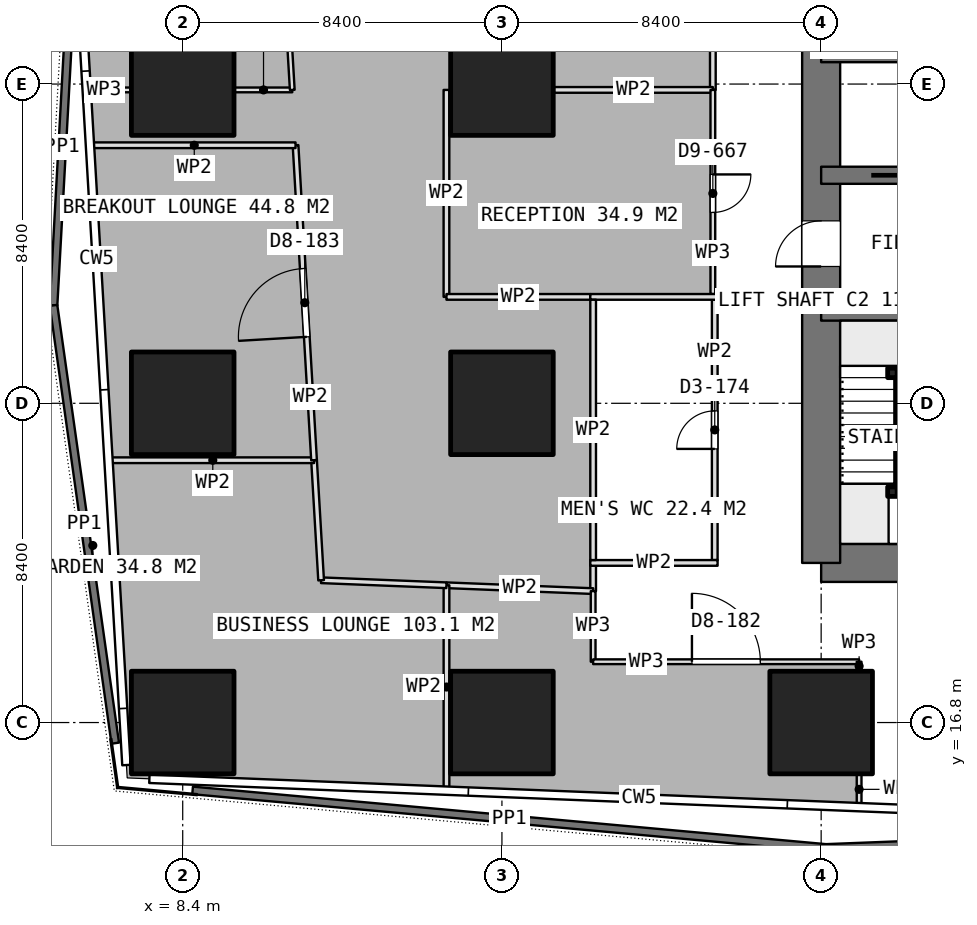
"""IFC4 building model, lengths in metres.
Left out: names, types, materials, properties, quantities, classifications, styles, units other than length and angle.
Written with IfcOpenShell. Run it as: python <this file> out.ifc"""

import sys

from ifc_helpers import new_model, si_unit, direction, frame, frame_2d, origin, origin_2d, place, context, subcontext, project, spatial, rectangle, extrude, element, fill, save


model = new_model("IFC4")
c1 = context("Model", 3, precision=1e-05, world=origin(), true_north=direction((0.0, 1.0)))
c2 = subcontext(c1, "Body", "Model", "MODEL_VIEW")
j1 = project(units=[si_unit("LENGTHUNIT", "METRE"), si_unit("PLANEANGLEUNIT", "RADIAN")], contexts=[c1])
p1 = place(None, origin())
s1 = spatial("IfcSite", under=j1, at=p1, CompositionType="ELEMENT")
p2 = place(p1, origin())
s2 = spatial("IfcBuilding", under=s1, at=p2, CompositionType="ELEMENT")
p3 = place(p2, frame((0.0, 0.0, 168.2)))
s3 = spatial("IfcBuildingStorey", under=s2, at=p3, CompositionType="ELEMENT", Elevation=168.2)
p4 = place(p3, frame((25.2, 21.0, 0.0), z_axis=(0.0, 0.0, 1.0), x_axis=(1.0, 0.0, 0.0)))
e1 = element("IfcWall", 1, at=p4, inside=s3, PredefinedType="SHEAR", context=c2, shape_type="SweptSolid", body=[
    extrude(rectangle(XDim=10.4, YDim=1.0, at=frame_2d((5.2, 0.0))), origin(), (0.0, 0.0, 1.0), 4.5),
])
p5 = place(p3, frame((25.2, 21.0, 0.0), z_axis=(0.0, 0.0, 1.0), x_axis=(0.0, 1.0, 0.0)))
e2 = element("IfcWall", 2, at=p5, inside=s3, PredefinedType="SHEAR", context=c2, shape_type="SweptSolid", body=[
    extrude(rectangle(XDim=25.2, YDim=1.0, at=frame_2d((12.6, 0.0))), origin(), (0.0, 0.0, 1.0), 4.5),
])
p6 = place(p5, frame((7.8, 0.0, 0.0)))
e3 = element("IfcOpeningElement", 3, at=p6, cuts=e2, PredefinedType="OPENING", context=c2, shape_type="SweptSolid", body=[
    extrude(rectangle(XDim=1.2, YDim=2.1, at=frame_2d((0.6, 1.05))), frame((0.0, 0.51, 0.0), z_axis=(0.0, -1.0, 0.0), x_axis=(1.0, 0.0, 0.0)), (0.0, 0.0, 1.0), 1.02),
])
p7 = place(p5, frame((14.25, 0.0, 0.0)))
e4 = element("IfcOpeningElement", 4, at=p7, cuts=e2, PredefinedType="OPENING", context=c2, shape_type="SweptSolid", body=[
    extrude(rectangle(XDim=0.9, YDim=2.1, at=frame_2d((0.45, 1.05))), frame((0.0, 0.51, 0.0), z_axis=(0.0, -1.0, 0.0), x_axis=(1.0, 0.0, 0.0)), (0.0, 0.0, 1.0), 1.02),
])
p8 = place(p5, frame((16.85, 0.0, 0.0)))
e5 = element("IfcOpeningElement", 5, at=p8, cuts=e2, PredefinedType="OPENING", context=c2, shape_type="SweptSolid", body=[
    extrude(rectangle(XDim=0.9, YDim=2.1, at=frame_2d((0.45, 1.05))), frame((0.0, 0.51, 0.0), z_axis=(0.0, -1.0, 0.0), x_axis=(1.0, 0.0, 0.0)), (0.0, 0.0, 1.0), 1.02),
])
p9 = place(p5, frame((19.025, 0.0, 0.0)))
e6 = element("IfcOpeningElement", 6, at=p9, cuts=e2, PredefinedType="OPENING", context=c2, shape_type="SweptSolid", body=[
    extrude(rectangle(XDim=1.2, YDim=2.1, at=frame_2d((0.6, 1.05))), frame((0.0, 0.51, 0.0), z_axis=(0.0, -1.0, 0.0), x_axis=(1.0, 0.0, 0.0)), (0.0, 0.0, 1.0), 1.02),
])
p10 = place(p3, frame((25.2, 27.6, 0.0), z_axis=(0.0, 0.0, 1.0), x_axis=(1.0, 0.0, 0.0)))
e7 = element("IfcWall", 7, at=p10, inside=s3, PredefinedType="SHEAR", context=c2, shape_type="SweptSolid", body=[
    extrude(rectangle(XDim=6.6, YDim=0.45, at=frame_2d((3.3, 0.0))), origin(), (0.0, 0.0, 1.0), 4.5),
])
p11 = place(p10, frame((4.975, 0.0, 0.0)))
e8 = element("IfcOpeningElement", 8, at=p11, cuts=e7, PredefinedType="OPENING", context=c2, shape_type="SweptSolid", body=[
    extrude(rectangle(XDim=1.2, YDim=2.1, at=frame_2d((0.6, 1.05))), frame((0.0, 0.235, 0.0), z_axis=(0.0, -1.0, 0.0), x_axis=(1.0, 0.0, 0.0)), (0.0, 0.0, 1.0), 0.47),
])
p12 = place(p3, frame((25.2, 31.2, 0.0), z_axis=(0.0, 0.0, 1.0), x_axis=(1.0, 0.0, 0.0)))
e9 = element("IfcWall", 9, at=p12, inside=s3, PredefinedType="SHEAR", context=c2, shape_type="SweptSolid", body=[
    extrude(rectangle(XDim=6.6, YDim=0.45, at=frame_2d((3.3, 0.0))), origin(), (0.0, 0.0, 1.0), 4.5),
])
p13 = place(p12, frame((2.65, 0.0, 0.0)))
e10 = element("IfcOpeningElement", 10, at=p13, cuts=e9, PredefinedType="OPENING", context=c2, shape_type="SweptSolid", body=[
    extrude(rectangle(XDim=1.3, YDim=2.1, at=frame_2d((0.65, 1.05))), frame((0.0, 0.235, 0.0), z_axis=(0.0, -1.0, 0.0), x_axis=(1.0, 0.0, 0.0)), (0.0, 0.0, 1.0), 0.47),
])
p14 = place(p3, frame((25.2, 34.4, 0.0), z_axis=(0.0, 0.0, 1.0), x_axis=(1.0, 0.0, 0.0)))
e11 = element("IfcWall", 11, at=p14, inside=s3, PredefinedType="SHEAR", context=c2, shape_type="SweptSolid", body=[
    extrude(rectangle(XDim=6.6, YDim=0.45, at=frame_2d((3.3, 0.0))), origin(), (0.0, 0.0, 1.0), 4.5),
])
for number, where, z_axis, x_axis in (
    (12, (8.4, 16.8, 0.0), (0.0, 0.0, 1.0), (1.0, 0.0, 0.0)),
    (13, (8.4, 25.2, 0.0), (0.0, 0.0, 1.0), (1.0, 0.0, 0.0)),
    (14, (8.4, 33.6, 0.0), (0.0, 0.0, 1.0), (1.0, 0.0, 0.0)),
    (15, (16.8, 16.8, 0.0), (0.0, 0.0, 1.0), (1.0, 0.0, 0.0)),
    (16, (16.8, 25.2, 0.0), (0.0, 0.0, 1.0), (1.0, 0.0, 0.0)),
    (17, (16.8, 33.6, 0.0), (0.0, 0.0, 1.0), (1.0, 0.0, 0.0)),
    (18, (25.2, 16.8, 0.0), (0.0, 0.0, 1.0), (1.0, 0.0, 0.0)),
):
    element("IfcColumn", number, at=place(p3, frame(where, z_axis=z_axis, x_axis=x_axis)), inside=s3, PredefinedType="COLUMN", context=c2, shape_type="SweptSolid", body=[
        extrude(rectangle(XDim=2.7, YDim=2.7, at=origin_2d()), origin(), (0.0, 0.0, 1.0), 4.5),
    ])
p15 = place(p3, frame((5.457, 36.096, 0.0), z_axis=(0.0, 0.0, 1.0), x_axis=(-0.05473645857, -0.998500836306, 0.0)))
e19 = element("IfcWall", 19, at=p15, inside=s3, PredefinedType="PARAPET", context=c2, shape_type="SweptSolid", body=[
    extrude(rectangle(XDim=8.332, YDim=0.2, at=frame_2d((4.166, 0.0))), origin(), (0.0, 0.0, 1.0), 1.1),
])
p16 = place(p3, frame((5.001, 27.777, 0.0), z_axis=(0.0, 0.0, 1.0), x_axis=(0.139605325678, -0.990207227323, 0.0)))
e20 = element("IfcWall", 20, at=p16, inside=s3, PredefinedType="PARAPET", context=c2, shape_type="SweptSolid", body=[
    extrude(rectangle(XDim=11.633, YDim=0.2, at=frame_2d((5.816, 0.0))), origin(), (0.0, 0.0, 1.0), 1.1),
])
p17 = place(p3, frame((8.66, 15.014, 0.0), z_axis=(0.0, 0.0, 1.0), x_axis=(0.995901573545, -0.090443660974, 0.0)))
e21 = element("IfcWall", 21, at=p17, inside=s3, PredefinedType="PARAPET", context=c2, shape_type="SweptSolid", body=[
    extrude(rectangle(XDim=16.733, YDim=0.2, at=frame_2d((8.367, 0.0))), origin(), (0.0, 0.0, 1.0), 1.1),
])
p18 = place(p3, frame((25.325, 13.5, 0.0), z_axis=(0.0, 0.0, 1.0), x_axis=(0.999243289586, 0.03889534955, 0.0)))
e22 = element("IfcWall", 22, at=p18, inside=s3, PredefinedType="PARAPET", context=c2, shape_type="SweptSolid", body=[
    extrude(rectangle(XDim=10.771, YDim=0.2, at=frame_2d((5.385, 0.0))), origin(), (0.0, 0.0, 1.0), 1.1),
])
for number, where, z_axis, x_axis in (
    (23, (19.125, 21.0, 0.0), (0.0, 0.0, 1.0), (1.0, 0.0, 0.0)),
    (24, (19.125, 28.0, 0.0), (0.0, 0.0, 1.0), (1.0, 0.0, 0.0)),
):
    element("IfcWall", number, at=place(p3, frame(where, z_axis=z_axis, x_axis=x_axis)), inside=s3, PredefinedType="PARTITIONING", context=c2, shape_type="SweptSolid", body=[
        extrude(rectangle(XDim=3.35, YDim=0.15, at=frame_2d((1.675, 0.0))), origin(), (0.0, 0.0, 1.0), 4.25),
    ])
p19 = place(p3, frame((19.2, 21.075, 0.0), z_axis=(0.0, 0.0, 1.0), x_axis=(0.0, 1.0, 0.0)))
e25 = element("IfcWall", 25, at=p19, inside=s3, PredefinedType="PARTITIONING", context=c2, shape_type="SweptSolid", body=[
    extrude(rectangle(XDim=6.85, YDim=0.15, at=frame_2d((3.425, 0.0))), origin(), (0.0, 0.0, 1.0), 4.25),
])
p20 = place(p3, frame((22.4, 21.075, 0.0), z_axis=(0.0, 0.0, 1.0), x_axis=(0.0, 1.0, 0.0)))
e26 = element("IfcWall", 26, at=p20, inside=s3, PredefinedType="PARTITIONING", context=c2, shape_type="SweptSolid", body=[
    extrude(rectangle(XDim=6.85, YDim=0.15, at=frame_2d((3.425, 0.0))), origin(), (0.0, 0.0, 1.0), 4.25),
])
p21 = place(p20, frame((2.925, 0.0, 0.0)))
e27 = element("IfcOpeningElement", 27, at=p21, cuts=e26, PredefinedType="OPENING", context=c2, shape_type="SweptSolid", body=[
    extrude(rectangle(XDim=1.0, YDim=2.1, at=frame_2d((0.5, 1.05))), frame((0.0, 0.085, 0.0), z_axis=(0.0, -1.0, 0.0), x_axis=(1.0, 0.0, 0.0)), (0.0, 0.0, 1.0), 0.17),
])
p22 = place(p3, frame((11.283, 33.446, 0.0), z_axis=(0.0, 0.0, 1.0), x_axis=(-1.0, 0.0, 0.0)))
e28 = element("IfcWall", 28, at=p22, inside=s3, PredefinedType="PARTITIONING", context=c2, shape_type="SweptSolid", body=[
    extrude(rectangle(XDim=1.513, YDim=0.125, at=frame_2d((0.756, 0.0))), origin(), (0.0, 0.0, 1.0), 4.25),
])
p23 = place(p3, frame((7.03, 33.446, 0.0), z_axis=(0.0, 0.0, 1.0), x_axis=(-1.0, 0.0, 0.0)))
e29 = element("IfcWall", 29, at=p23, inside=s3, PredefinedType="PARTITIONING", context=c2, shape_type="SweptSolid", body=[
    extrude(rectangle(XDim=1.076, YDim=0.125, at=frame_2d((0.538, 0.0))), origin(), (0.0, 0.0, 1.0), 4.25),
])
p24 = place(p3, frame((10.765, 42.248, 0.0), z_axis=(0.0, 0.0, 1.0), x_axis=(0.05875610806, -0.998272367526, 0.0)))
e30 = element("IfcWall", 30, at=p24, inside=s3, PredefinedType="PARTITIONING", context=c2, shape_type="SweptSolid", body=[
    extrude(rectangle(XDim=8.817, YDim=0.125, at=frame_2d((4.409, 0.0))), origin(), (0.0, 0.0, 1.0), 4.25),
])
p25 = place(p24, frame((3.509, 0.0, 0.0)))
e31 = element("IfcOpeningElement", 31, at=p25, cuts=e30, PredefinedType="OPENING", context=c2, shape_type="SweptSolid", body=[
    extrude(rectangle(XDim=1.8, YDim=2.1, at=frame_2d((0.9, 1.05))), frame((0.0, 0.073, 0.0), z_axis=(0.0, -1.0, 0.0), x_axis=(1.0, 0.0, 0.0)), (0.0, 0.0, 1.0), 0.145),
])
p26 = place(p3, frame((22.35, 53.25, 0.0), z_axis=(0.0, 0.0, 1.0), x_axis=(0.0, -1.0, 0.0)))
e32 = element("IfcWall", 32, at=p26, inside=s3, PredefinedType="PARTITIONING", context=c2, shape_type="SweptSolid", body=[
    extrude(rectangle(XDim=19.804, YDim=0.15, at=frame_2d((9.902, 0.0))), origin(), (0.0, 0.0, 1.0), 4.25),
])
p27 = place(p26, frame((9.402, 0.0, 0.0)))
e33 = element("IfcOpeningElement", 33, at=p27, cuts=e32, PredefinedType="OPENING", context=c2, shape_type="SweptSolid", body=[
    extrude(rectangle(XDim=1.0, YDim=2.1, at=frame_2d((0.5, 1.05))), frame((0.0, 0.085, 0.0), z_axis=(0.0, -1.0, 0.0), x_axis=(1.0, 0.0, 0.0)), (0.0, 0.0, 1.0), 0.17),
])
p28 = place(p3, frame((22.35, 33.446, 0.0), z_axis=(0.0, 0.0, 1.0), x_axis=(-1.0, 0.0, 0.0)))
e34 = element("IfcWall", 34, at=p28, inside=s3, PredefinedType="PARTITIONING", context=c2, shape_type="SweptSolid", body=[
    extrude(rectangle(XDim=4.18, YDim=0.15, at=frame_2d((2.09, 0.0))), origin(), (0.0, 0.0, 1.0), 4.25),
])
p29 = place(p3, frame((15.34, 33.446, 0.0), z_axis=(0.0, 0.0, 1.0), x_axis=(0.0, -1.0, 0.0)))
e35 = element("IfcWall", 35, at=p29, inside=s3, PredefinedType="PARTITIONING", context=c2, shape_type="SweptSolid", body=[
    extrude(rectangle(XDim=5.446, YDim=0.15, at=frame_2d((2.723, 0.0))), origin(), (0.0, 0.0, 1.0), 4.25),
])
p30 = place(p3, frame((15.34, 28.0, 0.0), z_axis=(0.0, 0.0, 1.0), x_axis=(1.0, 0.0, 0.0)))
e36 = element("IfcWall", 36, at=p30, inside=s3, PredefinedType="PARTITIONING", context=c2, shape_type="SweptSolid", body=[
    extrude(rectangle(XDim=3.784, YDim=0.15, at=frame_2d((1.892, 0.0))), origin(), (0.0, 0.0, 1.0), 4.25),
])
p31 = place(p3, frame((19.2, 21.075, 0.0), z_axis=(0.0, 0.0, 1.0), x_axis=(0.0, -1.0, 0.0)))
e37 = element("IfcWall", 37, at=p31, inside=s3, PredefinedType="PARTITIONING", context=c2, shape_type="SweptSolid", body=[
    extrude(rectangle(XDim=0.817, YDim=0.15, at=frame_2d((0.408, 0.0))), origin(), (0.0, 0.0, 1.0), 4.25),
])
p32 = place(p3, frame((19.2, 20.258, 0.0), z_axis=(0.0, 0.0, 1.0), x_axis=(-0.999204086199, 0.039889774667, 0.0)))
e38 = element("IfcWall", 38, at=p32, inside=s3, PredefinedType="PARTITIONING", context=c2, shape_type="SweptSolid", body=[
    extrude(rectangle(XDim=3.862, YDim=0.15, at=frame_2d((1.931, 0.0))), origin(), (0.0, 0.0, 1.0), 4.25),
])
p33 = place(p3, frame((15.341, 20.412, 0.0), z_axis=(0.0, 0.0, 1.0), x_axis=(0.0, -1.0, 0.0)))
e39 = element("IfcWall", 39, at=p33, inside=s3, PredefinedType="PARTITIONING", context=c2, shape_type="SweptSolid", body=[
    extrude(rectangle(XDim=5.355, YDim=0.15, at=frame_2d((2.678, 0.0))), origin(), (0.0, 0.0, 1.0), 4.25),
])
p34 = place(p3, frame((15.34, 20.412, 0.0), z_axis=(0.0, 0.0, 1.0), x_axis=(-0.999202021772, 0.039941453235, 0.0)))
e40 = element("IfcWall", 40, at=p34, inside=s3, PredefinedType="PARTITIONING", context=c2, shape_type="SweptSolid", body=[
    extrude(rectangle(XDim=3.301, YDim=0.15, at=frame_2d((1.65, 0.0))), origin(), (0.0, 0.0, 1.0), 4.25),
])
p35 = place(p3, frame((12.042, 20.544, 0.0), z_axis=(0.0, 0.0, 1.0), x_axis=(-0.058807979637, 0.998269313127, 0.0)))
e41 = element("IfcWall", 41, at=p35, inside=s3, PredefinedType="PARTITIONING", context=c2, shape_type="SweptSolid", body=[
    extrude(rectangle(XDim=3.163, YDim=0.15, at=frame_2d((1.582, 0.0))), origin(), (0.0, 0.0, 1.0), 4.25),
])
p36 = place(p3, frame((11.856, 23.702, 0.0), z_axis=(0.0, 0.0, 1.0), x_axis=(-1.0, 0.0, 0.0)))
e42 = element("IfcWall", 42, at=p36, inside=s3, PredefinedType="PARTITIONING", context=c2, shape_type="SweptSolid", body=[
    extrude(rectangle(XDim=5.329, YDim=0.15, at=frame_2d((2.665, 0.0))), origin(), (0.0, 0.0, 1.0), 4.25),
])
p37 = place(p3, frame((11.856, 23.703, 0.0), z_axis=(0.0, 0.0, 1.0), x_axis=(-0.058672025665, 0.998277312877, 0.0)))
e43 = element("IfcWall", 43, at=p37, inside=s3, PredefinedType="PARTITIONING", context=c2, shape_type="SweptSolid", body=[
    extrude(rectangle(XDim=8.302, YDim=0.15, at=frame_2d((4.151, 0.0))), origin(), (0.0, 0.0, 1.0), 4.25),
])
p38 = place(p37, frame((3.251, 0.0, 0.0)))
e44 = element("IfcOpeningElement", 44, at=p38, cuts=e43, PredefinedType="OPENING", context=c2, shape_type="SweptSolid", body=[
    extrude(rectangle(XDim=1.8, YDim=2.1, at=frame_2d((0.9, 1.05))), frame((0.0, 0.085, 0.0), z_axis=(0.0, -1.0, 0.0), x_axis=(1.0, 0.0, 0.0)), (0.0, 0.0, 1.0), 0.17),
])
p39 = place(p3, frame((11.369, 31.99, 0.0), z_axis=(0.0, 0.0, 1.0), x_axis=(-1.0, 0.0, 0.0)))
e45 = element("IfcWall", 45, at=p39, inside=s3, PredefinedType="PARTITIONING", context=c2, shape_type="SweptSolid", body=[
    extrude(rectangle(XDim=5.33, YDim=0.15, at=frame_2d((2.665, 0.0))), origin(), (0.0, 0.0, 1.0), 4.25),
])
p40 = place(p3, frame((19.2, 20.258, 0.0), z_axis=(0.0, 0.0, 1.0), x_axis=(0.0, -1.0, 0.0)))
e46 = element("IfcWall", 46, at=p40, inside=s3, PredefinedType="PARTITIONING", context=c2, shape_type="SweptSolid", body=[
    extrude(rectangle(XDim=1.858, YDim=0.125, at=frame_2d((0.929, 0.0))), origin(), (0.0, 0.0, 1.0), 4.25),
])
p41 = place(p3, frame((19.2, 18.4, 0.0), z_axis=(0.0, 0.0, 1.0), x_axis=(1.0, 0.0, 0.0)))
e47 = element("IfcWall", 47, at=p41, inside=s3, PredefinedType="PARTITIONING", context=c2, shape_type="SweptSolid", body=[
    extrude(rectangle(XDim=6.999, YDim=0.125, at=frame_2d((3.5, 0.0))), origin(), (0.0, 0.0, 1.0), 4.25),
])
p42 = place(p41, frame((2.6, 0.0, 0.0)))
e48 = element("IfcOpeningElement", 48, at=p42, cuts=e47, PredefinedType="OPENING", context=c2, shape_type="SweptSolid", body=[
    extrude(rectangle(XDim=1.8, YDim=2.1, at=frame_2d((0.9, 1.05))), frame((0.0, 0.073, 0.0), z_axis=(0.0, -1.0, 0.0), x_axis=(1.0, 0.0, 0.0)), (0.0, 0.0, 1.0), 0.145),
])
p43 = place(p3, frame((26.199, 18.4, 0.0), z_axis=(0.0, 0.0, 1.0), x_axis=(0.0, -1.0, 0.0)))
e49 = element("IfcWall", 49, at=p43, inside=s3, PredefinedType="PARTITIONING", context=c2, shape_type="SweptSolid", body=[
    extrude(rectangle(XDim=0.23, YDim=0.125, at=frame_2d((0.115, 0.0))), origin(), (0.0, 0.0, 1.0), 4.25),
])
p44 = place(p3, frame((26.199, 15.43, 0.0), z_axis=(0.0, 0.0, 1.0), x_axis=(0.0, -1.0, 0.0)))
e50 = element("IfcWall", 50, at=p44, inside=s3, PredefinedType="PARTITIONING", context=c2, shape_type="SweptSolid", body=[
    extrude(rectangle(XDim=0.776, YDim=0.125, at=frame_2d((0.388, 0.0))), origin(), (0.0, 0.0, 1.0), 4.25),
])
p45 = place(p3, frame((22.35, 33.445, 0.0), z_axis=(0.0, 0.0, 1.0), x_axis=(0.0, -1.0, 0.0)))
e51 = element("IfcWall", 51, at=p45, inside=s3, PredefinedType="PARTITIONING", context=c2, shape_type="SweptSolid", body=[
    extrude(rectangle(XDim=5.37, YDim=0.125, at=frame_2d((2.685, 0.0))), origin(), (0.0, 0.0, 1.0), 4.25),
])
p46 = place(p45, frame((2.223, 0.0, 0.0)))
e52 = element("IfcOpeningElement", 52, at=p46, cuts=e51, PredefinedType="OPENING", context=c2, shape_type="SweptSolid", body=[
    extrude(rectangle(XDim=1.0, YDim=2.1, at=frame_2d((0.5, 1.05))), frame((0.0, 0.073, 0.0), z_axis=(0.0, -1.0, 0.0), x_axis=(1.0, 0.0, 0.0)), (0.0, 0.0, 1.0), 0.145),
])
for number, where, z_axis, x_axis in (
    (53, (27.075, 22.875, 0.0), (0.0, 0.0, 1.0), (1.0, 0.0, 0.0)),
    (54, (27.075, 26.0, 0.0), (0.0, 0.0, 1.0), (1.0, 0.0, 0.0)),
):
    element("IfcColumn", number, at=place(p3, frame(where, z_axis=z_axis, x_axis=x_axis)), inside=s3, PredefinedType="COLUMN", context=c2, shape_type="SweptSolid", body=[
        extrude(rectangle(XDim=0.25, YDim=0.25, at=origin_2d()), origin(), (0.0, 0.0, 1.0), 4.5),
    ])
p47 = place(p6, origin())
e55 = element("IfcDoor", 55, at=p47, inside=s3, OperationType="SINGLE_SWING_LEFT", PredefinedType="DOOR", context=c2, shape_type="SweptSolid", body=[
    extrude(rectangle(XDim=1.2, YDim=2.1, at=frame_2d((0.6, 1.05))), frame((0.0, 0.025, 0.0), z_axis=(0.0, -1.0, 0.0), x_axis=(1.0, 0.0, 0.0)), (0.0, 0.0, 1.0), 0.05),
])
fill(e3, e55)
p48 = place(p21, origin())
e56 = element("IfcDoor", 56, at=p48, inside=s3, OperationType="SINGLE_SWING_LEFT", PredefinedType="DOOR", context=c2, shape_type="SweptSolid", body=[
    extrude(rectangle(XDim=1.0, YDim=2.1, at=frame_2d((0.5, 1.05))), frame((0.0, 0.025, 0.0), z_axis=(0.0, -1.0, 0.0), x_axis=(1.0, 0.0, 0.0)), (0.0, 0.0, 1.0), 0.05),
])
fill(e27, e56)
p49 = place(p38, origin())
e57 = element("IfcDoor", 57, at=p49, inside=s3, OperationType="DOUBLE_DOOR_SINGLE_SWING", PredefinedType="DOOR", context=c2, shape_type="SweptSolid", body=[
    extrude(rectangle(XDim=1.8, YDim=2.1, at=frame_2d((0.9, 1.05))), frame((0.0, 0.025, 0.0), z_axis=(0.0, -1.0, 0.0), x_axis=(1.0, 0.0, 0.0)), (0.0, 0.0, 1.0), 0.05),
])
fill(e44, e57)
p50 = place(p42, origin())
e58 = element("IfcDoor", 58, at=p50, inside=s3, OperationType="DOUBLE_DOOR_SINGLE_SWING", PredefinedType="DOOR", context=c2, shape_type="SweptSolid", body=[
    extrude(rectangle(XDim=1.8, YDim=2.1, at=frame_2d((0.9, 1.05))), frame((0.0, 0.025, 0.0), z_axis=(0.0, -1.0, 0.0), x_axis=(1.0, 0.0, 0.0)), (0.0, 0.0, 1.0), 0.05),
])
fill(e48, e58)
p51 = place(p46, origin())
e59 = element("IfcDoor", 59, at=p51, inside=s3, OperationType="SINGLE_SWING_LEFT", PredefinedType="DOOR", context=c2, shape_type="SweptSolid", body=[
    extrude(rectangle(XDim=1.0, YDim=2.1, at=frame_2d((0.5, 1.05))), frame((0.0, 0.025, 0.0), z_axis=(0.0, -1.0, 0.0), x_axis=(1.0, 0.0, 0.0)), (0.0, 0.0, 1.0), 0.05),
])
fill(e52, e59)
save(model, sys.argv[1])
